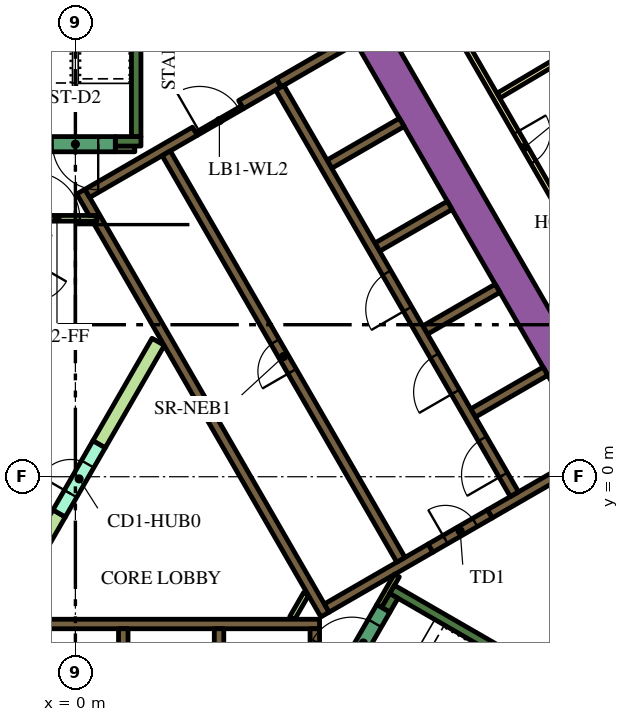
"""IFC4 building model, lengths in metres.
Left out: names, types, materials, properties, quantities, classifications, styles, units other than length and angle.
Written with IfcOpenShell. Run it as: python <this file> out.ifc"""

import sys

from ifc_helpers import new_model, si_unit, direction, frame, frame_2d, origin, place, context, subcontext, project, spatial, polyline, rectangle, outline, extrude, element, fill, save


model = new_model("IFC4")
c1 = context("Model", 3, precision=1e-05, world=origin(), true_north=direction((0.0, 1.0)))
c2 = subcontext(c1, "Body", "Model", "MODEL_VIEW")
j1 = project(units=[si_unit("LENGTHUNIT", "METRE"), si_unit("PLANEANGLEUNIT", "RADIAN")], contexts=[c1])
p1 = place(None, origin())
s1 = spatial("IfcSite", under=j1, at=p1, CompositionType="ELEMENT")
p2 = place(p1, origin())
s2 = spatial("IfcBuilding", under=s1, at=p2, CompositionType="ELEMENT")
p3 = place(p2, frame((0.0, 0.0, 111.0)))
s3 = spatial("IfcBuildingStorey", under=s2, at=p3, CompositionType="ELEMENT", Elevation=111.0)
p4 = place(p3, frame((6.711, 13.476, 0.0), z_axis=(0.0, 0.0, 1.0), x_axis=(0.500002723396, -0.866023831425, 0.0)))
e1 = element("IfcWall", 1, at=p4, inside=s3, PredefinedType="SOLIDWALL", context=c2, shape_type="SweptSolid", body=[
    extrude(rectangle(XDim=20.334, YDim=0.9, at=frame_2d((10.167, 0.0))), origin(), (0.0, 0.0, 1.0), 3.9),
])
p5 = place(p3, frame((11.695, -12.644, 0.0), z_axis=(0.0, 0.0, 1.0), x_axis=(0.500010229568, 0.86601949766, 0.0)))
e2 = element("IfcWall", 2, at=p5, inside=s3, PredefinedType="SOLIDWALL", context=c2, shape_type="SweptSolid", body=[
    extrude(rectangle(XDim=9.326, YDim=0.9, at=frame_2d((4.663, 0.0))), origin(), (0.0, 0.0, 1.0), 3.9),
])
p6 = place(p3, frame((8.334, -2.964, 0.0), z_axis=(0.0, 0.0, 1.0), x_axis=(0.866016039709, -0.500016218704, 0.0)))
e3 = element("IfcWall", 3, at=p6, inside=s3, PredefinedType="SOLIDWALL", context=c2, shape_type="SweptSolid", body=[
    extrude(rectangle(XDim=7.05, YDim=0.25, at=frame_2d((3.525, 0.0))), origin(), (0.0, 0.0, 1.0), 3.9),
])
p7 = place(p3, frame((8.168, -3.503, 0.0), z_axis=(0.0, 0.0, 1.0), x_axis=(0.49972245349, 0.866185586049, 0.0)))
e4 = element("IfcWall", 4, at=p7, inside=s3, PredefinedType="SOLIDWALL", context=c2, shape_type="SweptSolid", body=[
    extrude(rectangle(XDim=0.425, YDim=0.25, at=frame_2d((0.212, 0.0))), origin(), (0.0, 0.0, 1.0), 3.9),
])
p8 = place(p3, frame((1.6, 8.95, 0.0), z_axis=(0.0, 0.0, 1.0), x_axis=(0.0, 1.0, 0.0)))
e5 = element("IfcWall", 5, at=p8, inside=s3, PredefinedType="SOLIDWALL", context=c2, shape_type="SweptSolid", body=[
    extrude(rectangle(XDim=6.8, YDim=0.25, at=frame_2d((3.4, 0.0))), origin(), (0.0, 0.0, 1.0), 3.9),
])
p9 = place(p3, frame((1.05, 8.825, 0.0), z_axis=(0.0, 0.0, 1.0), x_axis=(1.0, 0.0, 0.0)))
e6 = element("IfcWall", 6, at=p9, inside=s3, PredefinedType="SOLIDWALL", context=c2, shape_type="SweptSolid", body=[
    extrude(rectangle(XDim=0.675, YDim=0.25, at=frame_2d((0.337, 0.0))), origin(), (0.0, 0.0, 1.0), 3.9),
])
p10 = place(p3, frame((-5.545, -3.875, 0.0), z_axis=(0.0, 0.0, 1.0), x_axis=(1.0, 0.0, 0.0)))
e7 = element("IfcWall", 7, at=p10, inside=s3, PredefinedType="SOLIDWALL", context=c2, shape_type="SweptSolid", body=[
    extrude(rectangle(XDim=11.97, YDim=0.25, at=frame_2d((5.985, 0.0))), origin(), (0.0, 0.0, 1.0), 3.9),
])
p11 = place(p3, frame((6.3, -7.268, 0.0), z_axis=(0.0, 0.0, 1.0), x_axis=(0.0, 1.0, 0.0)))
e8 = element("IfcWall", 8, at=p11, inside=s3, PredefinedType="SOLIDWALL", context=c2, shape_type="SweptSolid", body=[
    extrude(rectangle(XDim=3.268, YDim=0.25, at=frame_2d((1.634, 0.0))), origin(), (0.0, 0.0, 1.0), 3.9),
])
for number, where, z_axis, x_axis in (
    (9, (3.78, -4.0, 0.0), (0.0, 0.0, 1.0), (0.0, -1.0, 0.0)),
    (10, (1.26, -4.0, 0.0), (0.0, 0.0, 1.0), (0.0, -1.0, 0.0)),
    (11, (10.464, 1.677, 0.0), (0.0, 0.0, 1.0), (0.866, 0.5, 0.0)),
):
    element("IfcWall", number, at=place(p3, frame(where, z_axis=z_axis, x_axis=x_axis)), inside=s3, PredefinedType="SOLIDWALL", context=c2, shape_type="SweptSolid", body=[
        extrude(rectangle(XDim=2.2, YDim=0.25, at=frame_2d((1.1, 0.0))), origin(), (0.0, 0.0, 1.0), 3.9),
    ])
p12 = place(p3, frame((13.629, 0.594, 0.0), z_axis=(0.0, 0.0, 1.0), x_axis=(-0.86602790099, -0.499995674689, 0.0)))
e12 = element("IfcWall", 12, at=p12, inside=s3, PredefinedType="SOLIDWALL", context=c2, shape_type="SweptSolid", body=[
    extrude(rectangle(XDim=3.146, YDim=0.25, at=frame_2d((1.573, 0.0))), origin(), (0.0, 0.0, 1.0), 3.9),
])
p13 = place(p3, origin())
e13 = element("IfcWall", 13, at=p13, inside=s3, PredefinedType="SOLIDWALL", context=c2, shape_type="SweptSolid", body=[
    extrude(outline(polyline([(0.566, 6.725), (0.566, 6.875), (0.566, 6.875), (0.565, 6.875), (0.361, 6.875), (0.035, 7.439), (0.252, 7.564), (0.377, 7.348), (6.552, -3.348), (6.677, -3.564), (6.46, -3.689), (0.448, 6.725), (0.565, 6.725), (0.566, 6.725), (0.566, 6.725)])), origin(), (0.0, 0.0, 1.0), 3.9),
])
p14 = place(p3, frame((4.358, 9.791, 0.0), z_axis=(0.0, 0.0, 1.0), x_axis=(0.866079547155, 0.499906209203, 0.0)))
e14 = element("IfcWall", 14, at=p14, inside=s3, PredefinedType="SOLIDWALL", context=c2, shape_type="SweptSolid", body=[
    extrude(rectangle(XDim=1.15, YDim=0.25, at=frame_2d((0.575, 0.0))), origin(), (0.0, 0.0, 1.0), 3.9),
])
p15 = place(p3, frame((5.356, 10.367, 0.0), z_axis=(0.0, 0.0, 1.0), x_axis=(0.865978535641, 0.50008116922, 0.0)))
e15 = element("IfcWall", 15, at=p15, inside=s3, PredefinedType="SOLIDWALL", context=c2, shape_type="SweptSolid", body=[
    extrude(rectangle(XDim=2.278, YDim=0.25, at=frame_2d((1.139, 0.0))), origin(), (0.0, 0.0, 1.0), 3.9),
])
p16 = place(p3, frame((0.314, 7.456, 0.0), z_axis=(0.0, 0.0, 1.0), x_axis=(0.866013897511, 0.50001992892, 0.0)))
e16 = element("IfcWall", 16, at=p16, inside=s3, PredefinedType="SOLIDWALL", context=c2, shape_type="SweptSolid", body=[
    extrude(rectangle(XDim=3.268, YDim=0.25, at=frame_2d((1.634, 0.0))), origin(), (0.0, 0.0, 1.0), 3.9),
])
p17 = place(p3, frame((6.614, -3.456, 0.0), z_axis=(0.0, 0.0, 1.0), x_axis=(0.86602447079, 0.500001615989, 0.0)))
e17 = element("IfcWall", 17, at=p17, inside=s3, PredefinedType="SOLIDWALL", context=c2, shape_type="SweptSolid", body=[
    extrude(rectangle(XDim=3.154, YDim=0.25, at=frame_2d((1.577, 0.0))), origin(), (0.0, 0.0, 1.0), 3.9),
])
for number, where, z_axis, x_axis in (
    (18, (6.684, 8.224, 0.0), (0.0, 0.0, 1.0), (0.866, 0.5, 0.0)),
    (19, (7.944, 6.041, 0.0), (0.0, 0.0, 1.0), (0.866, 0.5, 0.0)),
    (20, (9.204, 3.859, 0.0), (0.0, 0.0, 1.0), (0.866, 0.5, 0.0)),
):
    element("IfcWall", number, at=place(p3, frame(where, z_axis=z_axis, x_axis=x_axis)), inside=s3, PredefinedType="SOLIDWALL", context=c2, shape_type="SweptSolid", body=[
        extrude(rectangle(XDim=2.2, YDim=0.25, at=frame_2d((1.1, 0.0))), origin(), (0.0, 0.0, 1.0), 3.9),
    ])
p18 = place(p3, frame((5.705, -3.718, 0.0), z_axis=(0.0, 0.0, 1.0), x_axis=(0.499962090823, 0.866047289552, 0.0)))
e21 = element("IfcWall", 21, at=p18, inside=s3, PredefinedType="PARTITIONING", context=c2, shape_type="SweptSolid", body=[
    extrude(rectangle(XDim=0.735, YDim=0.15, at=frame_2d((0.367, 0.0))), origin(), (0.0, 0.0, 1.0), 2.75),
])
p19 = place(p3, frame((8.459, -2.599, 0.0), z_axis=(0.0, 0.0, 1.0), x_axis=(-0.500041054325, -0.866001699761, 0.0)))
e22 = element("IfcWall", 22, at=p19, inside=s3, PredefinedType="PARTITIONING", context=c2, shape_type="SweptSolid", body=[
    extrude(rectangle(XDim=0.929, YDim=0.15, at=frame_2d((0.464, 0.0))), origin(), (0.0, 0.0, 1.0), 3.9),
])
e23 = element("IfcWall", 23, at=p13, inside=s3, PredefinedType="PARTITIONING", context=c2, shape_type="SweptSolid", body=[
    extrude(outline(polyline([(-0.59, -0.872), (-0.265, -1.059), (-1.822, -3.756), (-2.147, -3.568), (-0.59, -0.872)])), origin(), (0.0, 0.0, 1.0), 2.75),
])
e24 = element("IfcWall", 24, at=p13, inside=s3, PredefinedType="PARTITIONING", context=c2, shape_type="SweptSolid", body=[
    extrude(outline(polyline([(2.017, 3.643), (2.342, 3.456), (0.785, 0.76), (0.46, 0.947), (2.017, 3.643)])), origin(), (0.0, 0.0, 1.0), 2.75),
])
p20 = place(p3, frame((1.05, 8.625, 0.0), z_axis=(0.0, 0.0, 1.0), x_axis=(1.0, 0.0, 0.0)))
e25 = element("IfcWall", 25, at=p20, inside=s3, PredefinedType="PARTITIONING", context=c2, shape_type="SweptSolid", body=[
    extrude(rectangle(XDim=0.514, YDim=0.15, at=frame_2d((0.257, 0.0))), origin(), (0.0, 0.0, 1.0), 2.75),
])
p21 = place(p3, frame((11.553, -0.46, 0.0), z_axis=(0.0, 0.0, 1.0), x_axis=(-0.500006514828, 0.866021642414, 0.0)))
e26 = element("IfcWall", 26, at=p21, inside=s3, PredefinedType="SOLIDWALL", context=c2, shape_type="SweptSolid", body=[
    extrude(rectangle(XDim=12.35, YDim=0.25, at=frame_2d((6.175, 0.0))), origin(), (0.0, 0.0, 1.0), 3.9),
])
p22 = place(p21, frame((0.585, 0.0, 0.0)))
e27 = element("IfcOpeningElement", 27, at=p22, cuts=e26, PredefinedType="OPENING", context=c2, shape_type="SweptSolid", body=[
    extrude(rectangle(XDim=1.1, YDim=2.1, at=frame_2d((0.55, 1.05))), frame((0.0, 0.135, 0.0), z_axis=(0.0, -1.0, 0.0), x_axis=(1.0, 0.0, 0.0)), (0.0, 0.0, 1.0), 0.27),
])
p23 = place(p21, frame((3.105, 0.0, 0.0)))
e28 = element("IfcOpeningElement", 28, at=p23, cuts=e26, PredefinedType="OPENING", context=c2, shape_type="SweptSolid", body=[
    extrude(rectangle(XDim=1.1, YDim=2.1, at=frame_2d((0.55, 1.05))), frame((0.0, 0.135, 0.0), z_axis=(0.0, -1.0, 0.0), x_axis=(1.0, 0.0, 0.0)), (0.0, 0.0, 1.0), 0.27),
])
p24 = place(p21, frame((5.625, 0.0, 0.0)))
e29 = element("IfcOpeningElement", 29, at=p24, cuts=e26, PredefinedType="OPENING", context=c2, shape_type="SweptSolid", body=[
    extrude(rectangle(XDim=1.1, YDim=2.1, at=frame_2d((0.55, 1.05))), frame((0.0, 0.135, 0.0), z_axis=(0.0, -1.0, 0.0), x_axis=(1.0, 0.0, 0.0)), (0.0, 0.0, 1.0), 0.27),
])
p25 = place(p3, frame((8.565, -2.185, 0.0), z_axis=(0.0, 0.0, 1.0), x_axis=(-0.499997954832, 0.866026584559, 0.0)))
e30 = element("IfcWall", 30, at=p25, inside=s3, PredefinedType="SOLIDWALL", context=c2, shape_type="SweptSolid", body=[
    extrude(rectangle(XDim=12.35, YDim=0.25, at=frame_2d((6.175, 0.0))), origin(), (0.0, 0.0, 1.0), 3.9),
])
p26 = place(p25, frame((5.725, 0.0, 0.0)))
e31 = element("IfcOpeningElement", 31, at=p26, cuts=e30, PredefinedType="OPENING", context=c2, shape_type="SweptSolid", body=[
    extrude(rectangle(XDim=0.9, YDim=2.1, at=frame_2d((0.45, 1.05))), frame((0.0, 0.135, 0.0), z_axis=(0.0, -1.0, 0.0), x_axis=(1.0, 0.0, 0.0)), (0.0, 0.0, 1.0), 0.27),
])
p27 = place(p3, frame((7.053, -5.284, 0.0), z_axis=(0.0, 0.0, 1.0), x_axis=(0.500078061341, 0.865980330357, 0.0)))
e32 = element("IfcWall", 32, at=p27, inside=s3, PredefinedType="SOLIDWALL", context=c2, shape_type="SweptSolid", body=[
    extrude(rectangle(XDim=2.1, YDim=0.4, at=frame_2d((1.05, 0.0))), origin(), (0.0, 0.0, 1.0), 3.9),
])
p28 = place(p27, frame((0.45, 0.0, 0.0)))
e33 = element("IfcOpeningElement", 33, at=p28, cuts=e32, PredefinedType="OPENING", context=c2, shape_type="SweptSolid", body=[
    extrude(rectangle(XDim=1.2, YDim=2.1, at=frame_2d((0.6, 1.05))), frame((0.0, 0.21, 0.0), z_axis=(0.0, -1.0, 0.0), x_axis=(1.0, 0.0, 0.0)), (0.0, 0.0, 1.0), 0.42),
])
p29 = place(p3, frame((9.346, -1.879, 0.0), z_axis=(0.0, 0.0, 1.0), x_axis=(0.866047807691, 0.499961193289, 0.0)))
e34 = element("IfcWall", 34, at=p29, inside=s3, PredefinedType="SOLIDWALL", context=c2, shape_type="SweptSolid", body=[
    extrude(rectangle(XDim=1.8, YDim=0.25, at=frame_2d((0.9, 0.0))), origin(), (0.0, 0.0, 1.0), 3.9),
])
p30 = place(p29, frame((0.45, 0.0, 0.0)))
e35 = element("IfcOpeningElement", 35, at=p30, cuts=e34, PredefinedType="OPENING", context=c2, shape_type="SweptSolid", body=[
    extrude(rectangle(XDim=0.9, YDim=2.1, at=frame_2d((0.45, 1.05))), frame((0.0, 0.135, 0.0), z_axis=(0.0, -1.0, 0.0), x_axis=(1.0, 0.0, 0.0)), (0.0, 0.0, 1.0), 0.27),
])
p31 = place(p3, frame((1.05, 8.75, 0.0), z_axis=(0.0, 0.0, 1.0), x_axis=(-1.0, 0.0, 0.0)))
e36 = element("IfcWall", 36, at=p31, inside=s3, PredefinedType="SOLIDWALL", context=c2, shape_type="SweptSolid", body=[
    extrude(rectangle(XDim=2.1, YDim=0.4, at=frame_2d((1.05, 0.0))), origin(), (0.0, 0.0, 1.0), 3.9),
])
p32 = place(p31, frame((0.45, 0.0, 0.0)))
e37 = element("IfcOpeningElement", 37, at=p32, cuts=e36, PredefinedType="OPENING", context=c2, shape_type="SweptSolid", body=[
    extrude(rectangle(XDim=1.2, YDim=2.1, at=frame_2d((0.6, 1.05))), frame((0.0, 0.21, 0.0), z_axis=(0.0, -1.0, 0.0), x_axis=(1.0, 0.0, 0.0)), (0.0, 0.0, 1.0), 0.42),
])
p33 = place(p3, frame((-0.427, -0.966, 0.0), z_axis=(0.0, 0.0, 1.0), x_axis=(0.49994051562, 0.866059744384, 0.0)))
e38 = element("IfcWall", 38, at=p33, inside=s3, PredefinedType="PARTITIONING", context=c2, shape_type="SweptSolid", body=[
    extrude(rectangle(XDim=2.1, YDim=0.375, at=frame_2d((1.05, 0.0))), origin(), (0.0, 0.0, 1.0), 2.75),
])
p34 = place(p33, frame((0.6, 0.0, 0.0)))
e39 = element("IfcOpeningElement", 39, at=p34, cuts=e38, PredefinedType="OPENING", context=c2, shape_type="SweptSolid", body=[
    extrude(rectangle(XDim=0.9, YDim=2.1, at=frame_2d((0.45, 1.05))), frame((0.0, 0.198, 0.0), z_axis=(0.0, -1.0, 0.0), x_axis=(1.0, 0.0, 0.0)), (0.0, 0.0, 1.0), 0.395),
])
p35 = place(p3, frame((-1.534, 6.8, 0.0), z_axis=(0.0, 0.0, 1.0), x_axis=(1.0, 0.0, 0.0)))
e40 = element("IfcWall", 40, at=p35, inside=s3, PredefinedType="PARTITIONING", context=c2, shape_type="SweptSolid", body=[
    extrude(rectangle(XDim=2.1, YDim=0.15, at=frame_2d((1.05, 0.0))), origin(), (0.0, 0.0, 1.0), 2.75),
])
p36 = place(p35, frame((0.45, 0.0, 0.0)))
e41 = element("IfcOpeningElement", 41, at=p36, cuts=e40, PredefinedType="OPENING", context=c2, shape_type="SweptSolid", body=[
    extrude(rectangle(XDim=1.2, YDim=2.1, at=frame_2d((0.6, 1.05))), frame((0.0, 0.085, 0.0), z_axis=(0.0, -1.0, 0.0), x_axis=(1.0, 0.0, 0.0)), (0.0, 0.0, 1.0), 0.17),
])
p37 = place(p3, frame((3.183, 9.02, 0.0), z_axis=(0.0, 0.0, 1.0), x_axis=(0.866034573852, 0.49998411664, 0.0)))
e42 = element("IfcWall", 42, at=p37, inside=s3, PredefinedType="PARTITIONING", context=c2, shape_type="SweptSolid", body=[
    extrude(rectangle(XDim=1.4, YDim=0.09, at=frame_2d((0.7, 0.0))), origin(), (0.0, 0.0, 1.0), 2.75),
])
p38 = place(p37, frame((0.1, 0.0, 0.0)))
e43 = element("IfcOpeningElement", 43, at=p38, cuts=e42, PredefinedType="OPENING", context=c2, shape_type="SweptSolid", body=[
    extrude(rectangle(XDim=1.2, YDim=2.1, at=frame_2d((0.6, 1.05))), frame((0.0, 0.055, 0.0), z_axis=(0.0, -1.0, 0.0), x_axis=(1.0, 0.0, 0.0)), (0.0, 0.0, 1.0), 0.11),
])
p39 = place(p3, frame((6.163, 18.475, 0.0), z_axis=(0.0, 0.0, 1.0), x_axis=(0.500001317485, -0.866024643133, 0.0)))
e44 = element("IfcWall", 44, at=p39, inside=s3, PredefinedType="PARTITIONING", context=c2, shape_type="SweptSolid", body=[
    extrude(rectangle(XDim=25.767, YDim=0.15, at=frame_2d((12.883, 0.0))), origin(), (0.0, 0.0, 1.0), 2.75),
])
p40 = place(p39, frame((24.241, 0.0, 0.0)))
e45 = element("IfcOpeningElement", 45, at=p40, cuts=e44, PredefinedType="OPENING", context=c2, shape_type="SweptSolid", body=[
    extrude(rectangle(XDim=1.0, YDim=2.1, at=frame_2d((0.5, 1.05))), frame((0.0, 0.085, 0.0), z_axis=(0.0, -1.0, 0.0), x_axis=(1.0, 0.0, 0.0)), (0.0, 0.0, 1.0), 0.17),
])
p41 = place(p39, frame((13.144, 0.0, 0.0)))
e46 = element("IfcOpeningElement", 46, at=p41, cuts=e44, PredefinedType="OPENING", context=c2, shape_type="SweptSolid", body=[
    extrude(rectangle(XDim=1.0, YDim=2.1, at=frame_2d((0.5, 1.05))), frame((0.0, 0.085, 0.0), z_axis=(0.0, -1.0, 0.0), x_axis=(1.0, 0.0, 0.0)), (0.0, 0.0, 1.0), 0.17),
])
p42 = place(p39, frame((10.874, 0.0, 0.0)))
e47 = element("IfcOpeningElement", 47, at=p42, cuts=e44, PredefinedType="OPENING", context=c2, shape_type="SweptSolid", body=[
    extrude(rectangle(XDim=0.9, YDim=2.1, at=frame_2d((0.45, 1.05))), frame((0.0, 0.085, 0.0), z_axis=(0.0, -1.0, 0.0), x_axis=(1.0, 0.0, 0.0)), (0.0, 0.0, 1.0), 0.17),
])
p43 = place(p39, frame((3.718, 0.0, 0.0)))
e48 = element("IfcOpeningElement", 48, at=p43, cuts=e44, PredefinedType="OPENING", context=c2, shape_type="SweptSolid", body=[
    extrude(rectangle(XDim=1.0, YDim=2.1, at=frame_2d((0.5, 1.05))), frame((0.0, 0.085, 0.0), z_axis=(0.0, -1.0, 0.0), x_axis=(1.0, 0.0, 0.0)), (0.0, 0.0, 1.0), 0.17),
])
p44 = place(p39, frame((2.411, 0.0, 0.0)))
e49 = element("IfcOpeningElement", 49, at=p44, cuts=e44, PredefinedType="OPENING", context=c2, shape_type="SweptSolid", body=[
    extrude(rectangle(XDim=1.0, YDim=2.1, at=frame_2d((0.5, 1.05))), frame((0.0, 0.085, 0.0), z_axis=(0.0, -1.0, 0.0), x_axis=(1.0, 0.0, 0.0)), (0.0, 0.0, 1.0), 0.17),
])
p45 = place(p3, frame((17.379, 13.731, 0.0), z_axis=(0.0, 0.0, 1.0), x_axis=(-0.860132461691, -0.510070728768, 0.0)))
e50 = element("IfcWall", 50, at=p45, inside=s3, PredefinedType="PARTITIONING", context=c2, shape_type="SweptSolid", body=[
    extrude(rectangle(XDim=7.257, YDim=0.15, at=frame_2d((3.628, 0.0))), origin(), (0.0, 0.0, 1.0), 2.75),
])
p46 = place(p22, origin())
e51 = element("IfcDoor", 51, at=p46, inside=s3, OperationType="DOUBLE_DOOR_SLIDING", PredefinedType="DOOR", context=c2, shape_type="SweptSolid", body=[
    extrude(rectangle(XDim=1.1, YDim=2.1, at=frame_2d((0.55, 1.05))), frame((0.0, 0.025, 0.0), z_axis=(0.0, -1.0, 0.0), x_axis=(1.0, 0.0, 0.0)), (0.0, 0.0, 1.0), 0.05),
])
fill(e27, e51)
p47 = place(p23, origin())
e52 = element("IfcDoor", 52, at=p47, inside=s3, OperationType="DOUBLE_DOOR_SLIDING", PredefinedType="DOOR", context=c2, shape_type="SweptSolid", body=[
    extrude(rectangle(XDim=1.1, YDim=2.1, at=frame_2d((0.55, 1.05))), frame((0.0, 0.025, 0.0), z_axis=(0.0, -1.0, 0.0), x_axis=(1.0, 0.0, 0.0)), (0.0, 0.0, 1.0), 0.05),
])
fill(e28, e52)
p48 = place(p24, origin())
e53 = element("IfcDoor", 53, at=p48, inside=s3, OperationType="DOUBLE_DOOR_SLIDING", PredefinedType="DOOR", context=c2, shape_type="SweptSolid", body=[
    extrude(rectangle(XDim=1.1, YDim=2.1, at=frame_2d((0.55, 1.05))), frame((0.0, 0.025, 0.0), z_axis=(0.0, -1.0, 0.0), x_axis=(1.0, 0.0, 0.0)), (0.0, 0.0, 1.0), 0.05),
])
fill(e29, e53)
p49 = place(p26, origin())
e54 = element("IfcDoor", 54, at=p49, inside=s3, OperationType="SINGLE_SWING_LEFT", PredefinedType="DOOR", context=c2, shape_type="SweptSolid", body=[
    extrude(rectangle(XDim=0.9, YDim=2.1, at=frame_2d((0.45, 1.05))), frame((0.0, 0.025, 0.0), z_axis=(0.0, -1.0, 0.0), x_axis=(1.0, 0.0, 0.0)), (0.0, 0.0, 1.0), 0.05),
])
fill(e31, e54)
p50 = place(p28, origin())
e55 = element("IfcDoor", 55, at=p50, inside=s3, OperationType="SINGLE_SWING_LEFT", PredefinedType="DOOR", context=c2, shape_type="SweptSolid", body=[
    extrude(rectangle(XDim=1.2, YDim=2.1, at=frame_2d((0.6, 1.05))), frame((0.0, 0.025, 0.0), z_axis=(0.0, -1.0, 0.0), x_axis=(1.0, 0.0, 0.0)), (0.0, 0.0, 1.0), 0.05),
])
fill(e33, e55)
p51 = place(p30, origin())
e56 = element("IfcDoor", 56, at=p51, inside=s3, OperationType="SINGLE_SWING_LEFT", PredefinedType="DOOR", context=c2, shape_type="SweptSolid", body=[
    extrude(rectangle(XDim=0.9, YDim=2.1, at=frame_2d((0.45, 1.05))), frame((0.0, 0.025, 0.0), z_axis=(0.0, -1.0, 0.0), x_axis=(1.0, 0.0, 0.0)), (0.0, 0.0, 1.0), 0.05),
])
fill(e35, e56)
p52 = place(p32, origin())
e57 = element("IfcDoor", 57, at=p52, inside=s3, OperationType="SINGLE_SWING_LEFT", PredefinedType="DOOR", context=c2, shape_type="SweptSolid", body=[
    extrude(rectangle(XDim=1.2, YDim=2.1, at=frame_2d((0.6, 1.05))), frame((0.0, 0.025, 0.0), z_axis=(0.0, -1.0, 0.0), x_axis=(1.0, 0.0, 0.0)), (0.0, 0.0, 1.0), 0.05),
])
fill(e37, e57)
p53 = place(p34, origin())
e58 = element("IfcDoor", 58, at=p53, inside=s3, OperationType="SINGLE_SWING_LEFT", PredefinedType="DOOR", context=c2, shape_type="SweptSolid", body=[
    extrude(rectangle(XDim=0.9, YDim=2.1, at=frame_2d((0.45, 1.05))), frame((0.0, 0.025, 0.0), z_axis=(0.0, -1.0, 0.0), x_axis=(1.0, 0.0, 0.0)), (0.0, 0.0, 1.0), 0.05),
])
fill(e39, e58)
p54 = place(p36, origin())
e59 = element("IfcDoor", 59, at=p54, inside=s3, OperationType="SINGLE_SWING_LEFT", PredefinedType="DOOR", context=c2, shape_type="SweptSolid", body=[
    extrude(rectangle(XDim=1.2, YDim=2.1, at=frame_2d((0.6, 1.05))), frame((0.0, 0.025, 0.0), z_axis=(0.0, -1.0, 0.0), x_axis=(1.0, 0.0, 0.0)), (0.0, 0.0, 1.0), 0.05),
])
fill(e41, e59)
p55 = place(p38, origin())
e60 = element("IfcDoor", 60, at=p55, inside=s3, OperationType="SINGLE_SWING_LEFT", PredefinedType="DOOR", context=c2, shape_type="SweptSolid", body=[
    extrude(rectangle(XDim=1.2, YDim=2.1, at=frame_2d((0.6, 1.05))), frame((0.0, 0.025, 0.0), z_axis=(0.0, -1.0, 0.0), x_axis=(1.0, 0.0, 0.0)), (0.0, 0.0, 1.0), 0.05),
])
fill(e43, e60)
p56 = place(p42, origin())
e61 = element("IfcDoor", 61, at=p56, inside=s3, OperationType="SINGLE_SWING_RIGHT", PredefinedType="DOOR", context=c2, shape_type="SweptSolid", body=[
    extrude(rectangle(XDim=0.9, YDim=2.1, at=frame_2d((0.45, 1.05))), frame((0.0, 0.025, 0.0), z_axis=(0.0, -1.0, 0.0), x_axis=(1.0, 0.0, 0.0)), (0.0, 0.0, 1.0), 0.05),
])
fill(e47, e61)
save(model, sys.argv[1])
